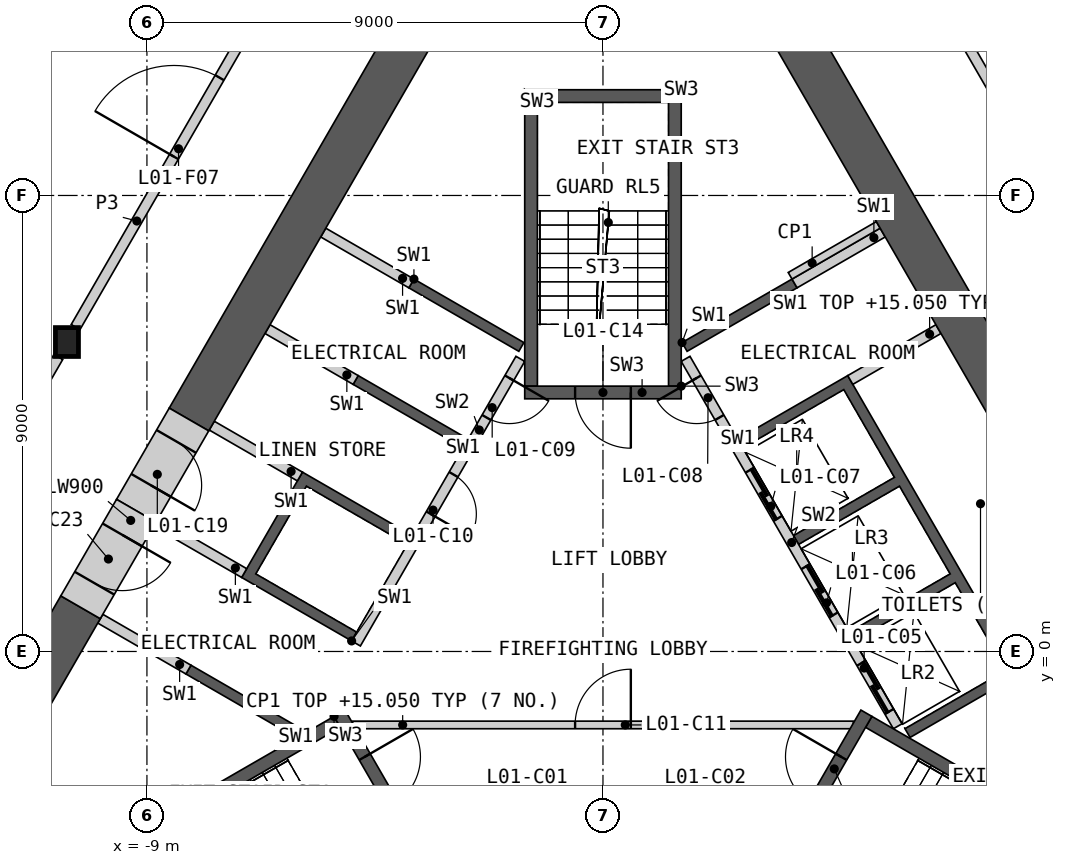
"""IFC4 building model, lengths in metres.
Left out: names, types, materials, properties, quantities, classifications, styles, units other than length and angle.
Written with IfcOpenShell. Run it as: python <this file> out.ifc"""

import sys

from ifc_helpers import new_model, si_unit, direction, frame, frame_2d, origin, origin_2d, place, context, subcontext, project, spatial, polyline, rectangle, i_section, outline, extrude, element, fill, save


model = new_model("IFC4")
c1 = context("Model", 3, precision=1e-05, world=origin(), true_north=direction((0.0, 1.0)))
c2 = subcontext(c1, "Body", "Model", "MODEL_VIEW")
j1 = project(units=[si_unit("LENGTHUNIT", "METRE"), si_unit("PLANEANGLEUNIT", "RADIAN")], contexts=[c1])
p1 = place(None, origin())
s1 = spatial("IfcSite", under=j1, at=p1, CompositionType="ELEMENT")
p2 = place(p1, origin())
s2 = spatial("IfcBuilding", under=s1, at=p2, CompositionType="ELEMENT")
p3 = place(p2, frame((0.0, 0.0, 10.0)))
s3 = spatial("IfcBuildingStorey", under=s2, at=p3, CompositionType="ELEMENT", Elevation=10.0)
p4 = place(p3, frame((-10.578, 6.107, 0.0), z_axis=(0.0, 0.0, 1.0), x_axis=(1.0, 0.0, 0.0)))
e1 = element("IfcColumn", 1, at=p4, inside=s3, PredefinedType="COLUMN", context=c2, shape_type="SweptSolid", body=[
    extrude(i_section(OverallWidth=0.454, OverallDepth=0.57, WebThickness=0.078, FlangeThickness=0.125, at=origin_2d()), origin(), (0.0, 0.0, 1.0), 5.5),
])
p5 = place(p3, origin())
e2 = element("IfcWall", 2, at=p5, inside=s3, PredefinedType="SHEAR", context=c2, shape_type="SweptSolid", body=[
    extrude(outline(polyline([(1.561, 6.097), (3.731, 7.35), (3.831, 7.177), (1.66, 5.924), (1.561, 6.097)])), origin(), (0.0, 0.0, 1.0), 5.05),
])
p6 = place(p3, origin())
e3 = element("IfcWall", 3, at=p6, inside=s3, PredefinedType="SHEAR", context=c2, shape_type="SweptSolid", body=[
    extrude(outline(polyline([(2.66, 4.192), (4.831, 5.445), (8.231, -0.444), (6.061, -1.697), (5.96, -1.524), (7.952, -0.374), (6.952, 1.358), (4.96, 0.208), (4.861, 0.381), (6.852, 1.531), (5.852, 3.263), (3.861, 2.113), (3.76, 2.287), (5.752, 3.437), (4.752, 5.169), (2.76, 4.019), (2.66, 4.192)])), origin(), (0.0, 0.0, 1.0), 5.05),
])
p7 = place(p3, frame((5.817, -1.476, 0.0), z_axis=(0.0, 0.0, 1.0), x_axis=(-0.500002616675, 0.866023893041, 0.0)))
e4 = element("IfcWall", 4, at=p7, inside=s3, PredefinedType="SOLIDWALL", context=c2, shape_type="SweptSolid", body=[
    extrude(rectangle(XDim=8.373, YDim=0.2, at=frame_2d((4.187, 0.0))), origin(), (0.0, 0.0, 1.0), 5.05),
])
p8 = place(p7, frame((0.337, 0.0, 0.0)))
e5 = element("IfcOpeningElement", 5, at=p8, cuts=e4, PredefinedType="OPENING", context=c2, shape_type="SweptSolid", body=[
    extrude(rectangle(XDim=1.1, YDim=2.1, at=frame_2d((0.55, 1.05))), frame((0.0, 0.11, 0.0), z_axis=(0.0, -1.0, 0.0), x_axis=(1.0, 0.0, 0.0)), (0.0, 0.0, 1.0), 0.22),
])
p9 = place(p7, frame((2.537, 0.0, 0.0)))
e6 = element("IfcOpeningElement", 6, at=p9, cuts=e4, PredefinedType="OPENING", context=c2, shape_type="SweptSolid", body=[
    extrude(rectangle(XDim=1.1, YDim=2.1, at=frame_2d((0.55, 1.05))), frame((0.0, 0.11, 0.0), z_axis=(0.0, -1.0, 0.0), x_axis=(1.0, 0.0, 0.0)), (0.0, 0.0, 1.0), 0.22),
])
p10 = place(p7, frame((4.737, 0.0, 0.0)))
e7 = element("IfcOpeningElement", 7, at=p10, cuts=e4, PredefinedType="OPENING", context=c2, shape_type="SweptSolid", body=[
    extrude(rectangle(XDim=1.1, YDim=2.1, at=frame_2d((0.55, 1.05))), frame((0.0, 0.11, 0.0), z_axis=(0.0, -1.0, 0.0), x_axis=(1.0, 0.0, 0.0)), (0.0, 0.0, 1.0), 0.22),
])
p11 = place(p7, frame((7.037, 0.0, 0.0)))
e8 = element("IfcOpeningElement", 8, at=p11, cuts=e4, PredefinedType="OPENING", context=c2, shape_type="SweptSolid", body=[
    extrude(rectangle(XDim=0.9, YDim=2.1, at=frame_2d((0.45, 1.05))), frame((0.0, 0.11, 0.0), z_axis=(0.0, -1.0, 0.0), x_axis=(1.0, 0.0, 0.0)), (0.0, 0.0, 1.0), 0.22),
])
p12 = place(p3, frame((4.881, 5.358, 0.0), z_axis=(0.0, 0.0, 1.0), x_axis=(0.866035824272, 0.499981950752, 0.0)))
e9 = element("IfcWall", 9, at=p12, inside=s3, PredefinedType="SHEAR", context=c2, shape_type="SweptSolid", body=[
    extrude(rectangle(XDim=2.009, YDim=0.2, at=frame_2d((1.004, 0.0))), origin(), (0.0, 0.0, 1.0), 5.05),
])
p13 = place(p3, frame((3.781, 7.263, 0.0), z_axis=(0.0, 0.0, 1.0), x_axis=(0.865983199114, 0.50007309351, 0.0)))
e10 = element("IfcWall", 10, at=p13, inside=s3, PredefinedType="SHEAR", context=c2, shape_type="SweptSolid", body=[
    extrude(rectangle(XDim=2.009, YDim=0.2, at=frame_2d((1.004, 0.0))), origin(), (0.0, 0.0, 1.0), 5.05),
])
p14 = place(p3, origin())
e11 = element("IfcWall", 11, at=p14, inside=s3, PredefinedType="SHEAR", context=c2, shape_type="SweptSolid", body=[
    extrude(outline(polyline([(-6.061, -1.697), (-8.231, -0.444), (-8.131, -0.271), (-5.96, -1.524), (-6.061, -1.697)])), origin(), (0.0, 0.0, 1.0), 5.05),
])
p15 = place(p3, origin())
e12 = element("IfcWall", 12, at=p15, inside=s3, PredefinedType="SHEAR", context=c2, shape_type="SweptSolid", body=[
    extrude(outline(polyline([(-4.96, 0.208), (-7.131, 1.461), (-5.931, 3.54), (-3.76, 2.287), (-3.861, 2.113), (-5.852, 3.263), (-6.852, 1.531), (-4.861, 0.381), (-4.96, 0.208)])), origin(), (0.0, 0.0, 1.0), 5.05),
])
p16 = place(p3, origin())
e13 = element("IfcWall", 13, at=p16, inside=s3, PredefinedType="SHEAR", context=c2, shape_type="SweptSolid", body=[
    extrude(outline(polyline([(-2.76, 4.019), (-4.931, 5.272), (-4.831, 5.445), (-2.66, 4.192), (-2.76, 4.019)])), origin(), (0.0, 0.0, 1.0), 5.05),
])
p17 = place(p3, origin())
e14 = element("IfcWall", 14, at=p17, inside=s3, PredefinedType="SHEAR", context=c2, shape_type="SweptSolid", body=[
    extrude(outline(polyline([(-3.731, 7.35), (-1.561, 6.097), (-1.66, 5.924), (-3.831, 7.177), (-3.731, 7.35)])), origin(), (0.0, 0.0, 1.0), 5.05),
])
p18 = place(p3, frame((-1.631, 5.776, 0.0), z_axis=(0.0, 0.0, 1.0), x_axis=(-0.499992876559, -0.866029516466, 0.0)))
e15 = element("IfcWall", 15, at=p18, inside=s3, PredefinedType="SOLIDWALL", context=c2, shape_type="SweptSolid", body=[
    extrude(rectangle(XDim=6.486, YDim=0.2, at=frame_2d((3.243, 0.0))), origin(), (0.0, 0.0, 1.0), 5.05),
])
p19 = place(p18, frame((0.437, 0.0, 0.0)))
e16 = element("IfcOpeningElement", 16, at=p19, cuts=e15, PredefinedType="OPENING", context=c2, shape_type="SweptSolid", body=[
    extrude(rectangle(XDim=0.9, YDim=2.1, at=frame_2d((0.45, 1.05))), frame((0.0, 0.11, 0.0), z_axis=(0.0, -1.0, 0.0), x_axis=(1.0, 0.0, 0.0)), (0.0, 0.0, 1.0), 0.22),
])
p20 = place(p18, frame((2.637, 0.0, 0.0)))
e17 = element("IfcOpeningElement", 17, at=p20, cuts=e15, PredefinedType="OPENING", context=c2, shape_type="SweptSolid", body=[
    extrude(rectangle(XDim=0.9, YDim=2.1, at=frame_2d((0.45, 1.05))), frame((0.0, 0.11, 0.0), z_axis=(0.0, -1.0, 0.0), x_axis=(1.0, 0.0, 0.0)), (0.0, 0.0, 1.0), 0.22),
])
p21 = place(p3, frame((-3.781, 7.263, 0.0), z_axis=(0.0, 0.0, 1.0), x_axis=(-0.865983199114, 0.50007309351, 0.0)))
e18 = element("IfcWall", 18, at=p21, inside=s3, PredefinedType="SHEAR", context=c2, shape_type="SweptSolid", body=[
    extrude(rectangle(XDim=2.009, YDim=0.2, at=frame_2d((1.004, 0.0))), origin(), (0.0, 0.0, 1.0), 5.05),
])
p22 = place(p3, frame((-4.881, 5.358, 0.0), z_axis=(0.0, 0.0, 1.0), x_axis=(-0.866035824272, 0.499981950752, 0.0)))
e19 = element("IfcWall", 19, at=p22, inside=s3, PredefinedType="SHEAR", context=c2, shape_type="SweptSolid", body=[
    extrude(rectangle(XDim=2.009, YDim=0.2, at=frame_2d((1.004, 0.0))), origin(), (0.0, 0.0, 1.0), 5.05),
])
p23 = place(p3, frame((-5.981, 3.453, 0.0), z_axis=(0.0, 0.0, 1.0), x_axis=(-0.866013584312, 0.500020471368, 0.0)))
e20 = element("IfcWall", 20, at=p23, inside=s3, PredefinedType="SHEAR", context=c2, shape_type="SweptSolid", body=[
    extrude(rectangle(XDim=2.009, YDim=0.2, at=frame_2d((1.005, 0.0))), origin(), (0.0, 0.0, 1.0), 5.05),
])
p24 = place(p3, frame((-7.081, 1.548, 0.0), z_axis=(0.0, 0.0, 1.0), x_axis=(-0.865983199114, 0.50007309351, 0.0)))
e21 = element("IfcWall", 21, at=p24, inside=s3, PredefinedType="SHEAR", context=c2, shape_type="SweptSolid", body=[
    extrude(rectangle(XDim=2.009, YDim=0.2, at=frame_2d((1.004, 0.0))), origin(), (0.0, 0.0, 1.0), 5.05),
])
p25 = place(p3, frame((-8.181, -0.357, 0.0), z_axis=(0.0, 0.0, 1.0), x_axis=(-0.866035824272, 0.499981950752, 0.0)))
e22 = element("IfcWall", 22, at=p25, inside=s3, PredefinedType="SHEAR", context=c2, shape_type="SweptSolid", body=[
    extrude(rectangle(XDim=2.009, YDim=0.2, at=frame_2d((1.004, 0.0))), origin(), (0.0, 0.0, 1.0), 5.05),
])
p26 = place(p3, frame((-4.941, -1.45, 0.0), z_axis=(0.0, 0.0, 1.0), x_axis=(1.0, 0.0, 0.0)))
e23 = element("IfcWall", 23, at=p26, inside=s3, PredefinedType="PARTITIONING", context=c2, shape_type="SweptSolid", body=[
    extrude(rectangle(XDim=9.882, YDim=0.15, at=frame_2d((4.941, 0.0))), origin(), (0.0, 0.0, 1.0), 5.05),
])
p27 = place(p26, frame((4.391, 0.0, 0.0)))
e24 = element("IfcOpeningElement", 24, at=p27, cuts=e23, PredefinedType="OPENING", context=c2, shape_type="SweptSolid", body=[
    extrude(rectangle(XDim=1.1, YDim=2.1, at=frame_2d((0.55, 1.05))), frame((0.0, 0.085, 0.0), z_axis=(0.0, -1.0, 0.0), x_axis=(1.0, 0.0, 0.0)), (0.0, 0.0, 1.0), 0.17),
])
p28 = place(p3, origin())
e25 = element("IfcWall", 25, at=p28, inside=s3, PredefinedType="SHEAR", context=c2, shape_type="SweptSolid", body=[
    extrude(outline(polyline([(-5.307, -1.281), (-10.374, -4.206), (-10.032, -4.298), (-5.182, -1.498), (-5.307, -1.281)])), origin(), (0.0, 0.0, 1.0), 5.05),
])
p29 = place(p3, frame((-5.199, -1.219, 0.0), z_axis=(0.0, 0.0, 1.0), x_axis=(0.499982516597, -0.866035497597, 0.0)))
e26 = element("IfcWall", 26, at=p29, inside=s3, PredefinedType="SHEAR", context=c2, shape_type="SweptSolid", body=[
    extrude(rectangle(XDim=3.088, YDim=0.25, at=frame_2d((1.544, 0.0))), origin(), (0.0, 0.0, 1.0), 5.05),
])
p30 = place(p29, frame((0.994, 0.0, 0.0)))
e27 = element("IfcOpeningElement", 27, at=p30, cuts=e26, PredefinedType="OPENING", context=c2, shape_type="SweptSolid", body=[
    extrude(rectangle(XDim=1.1, YDim=2.1, at=frame_2d((0.55, 1.05))), frame((0.0, 0.135, 0.0), z_axis=(0.0, -1.0, 0.0), x_axis=(1.0, 0.0, 0.0)), (0.0, 0.0, 1.0), 0.27),
])
p31 = place(p3, origin())
e28 = element("IfcWall", 28, at=p31, inside=s3, PredefinedType="SHEAR", context=c2, shape_type="SweptSolid", body=[
    extrude(outline(polyline([(10.032, -4.298), (10.374, -4.206), (5.307, -1.281), (5.182, -1.498), (10.032, -4.298)])), origin(), (0.0, 0.0, 1.0), 5.05),
])
p32 = place(p3, frame((3.655, -3.893, 0.0), z_axis=(0.0, 0.0, 1.0), x_axis=(0.499982516597, 0.866035497597, 0.0)))
e29 = element("IfcWall", 29, at=p32, inside=s3, PredefinedType="SHEAR", context=c2, shape_type="SweptSolid", body=[
    extrude(rectangle(XDim=3.088, YDim=0.25, at=frame_2d((1.544, 0.0))), origin(), (0.0, 0.0, 1.0), 5.05),
])
p33 = place(p32, frame((0.994, 0.0, 0.0)))
e30 = element("IfcOpeningElement", 30, at=p33, cuts=e29, PredefinedType="OPENING", context=c2, shape_type="SweptSolid", body=[
    extrude(rectangle(XDim=1.1, YDim=2.1, at=frame_2d((0.55, 1.05))), frame((0.0, 0.135, 0.0), z_axis=(0.0, -1.0, 0.0), x_axis=(1.0, 0.0, 0.0)), (0.0, 0.0, 1.0), 0.27),
])
p34 = place(p3, origin())
e31 = element("IfcWall", 31, at=p34, inside=s3, PredefinedType="SHEAR", context=c2, shape_type="SweptSolid", body=[
    extrude(outline(polyline([(1.544, 5.237), (1.544, 11.087), (1.294, 10.837), (1.294, 5.237), (1.544, 5.237)])), origin(), (0.0, 0.0, 1.0), 5.05),
])
p35 = place(p3, origin())
e32 = element("IfcWall", 32, at=p35, inside=s3, PredefinedType="SHEAR", context=c2, shape_type="SweptSolid", body=[
    extrude(outline(polyline([(1.544, 11.087), (-1.544, 11.087), (-1.294, 10.837), (1.294, 10.837), (1.544, 11.087)])), origin(), (0.0, 0.0, 1.0), 5.05),
])
p36 = place(p3, origin())
e33 = element("IfcWall", 33, at=p36, inside=s3, PredefinedType="SHEAR", context=c2, shape_type="SweptSolid", body=[
    extrude(outline(polyline([(-1.294, 10.837), (-1.544, 11.087), (-1.544, 5.237), (-1.294, 5.237), (-1.294, 10.837)])), origin(), (0.0, 0.0, 1.0), 5.05),
])
p37 = place(p3, frame((1.544, 5.112, 0.0), z_axis=(0.0, 0.0, 1.0), x_axis=(-1.0, 0.0, 0.0)))
e34 = element("IfcWall", 34, at=p37, inside=s3, PredefinedType="SHEAR", context=c2, shape_type="SweptSolid", body=[
    extrude(rectangle(XDim=3.088, YDim=0.25, at=frame_2d((1.544, 0.0))), origin(), (0.0, 0.0, 1.0), 5.05),
])
p38 = place(p37, frame((0.994, 0.0, 0.0)))
e35 = element("IfcOpeningElement", 35, at=p38, cuts=e34, PredefinedType="OPENING", context=c2, shape_type="SweptSolid", body=[
    extrude(rectangle(XDim=1.1, YDim=2.1, at=frame_2d((0.55, 1.05))), frame((0.0, 0.135, 0.0), z_axis=(0.0, -1.0, 0.0), x_axis=(1.0, 0.0, 0.0)), (0.0, 0.0, 1.0), 0.27),
])
p39 = place(p3, frame((3.693, 7.415, 0.0), z_axis=(0.0, 0.0, 1.0), x_axis=(0.866035824272, 0.499981950752, 0.0)))
e36 = element("IfcWall", 36, at=p39, inside=s3, PredefinedType="PARTITIONING", context=c2, shape_type="SweptSolid", body=[
    extrude(rectangle(XDim=2.009, YDim=0.15, at=frame_2d((1.004, 0.0))), origin(), (0.0, 0.0, 1.0), 5.05),
])
p40 = place(p3, frame((8.16, 4.596, 0.0), z_axis=(0.0, 0.0, 1.0), x_axis=(-0.500009830349, 0.866019728156, 0.0)))
e37 = element("IfcWall", 37, at=p40, inside=s3, PredefinedType="SHEAR", context=c2, shape_type="SweptSolid", body=[
    extrude(rectangle(XDim=15.541, YDim=0.9, at=frame_2d((7.771, 0.0))), origin(), (0.0, 0.0, 1.0), 5.05),
])
p41 = place(p3, frame((-3.675, 12.365, 0.0), z_axis=(0.0, 0.0, 1.0), x_axis=(-0.500014716158, -0.86601690724, 0.0)))
e38 = element("IfcWall", 38, at=p41, inside=s3, PredefinedType="SHEAR", context=c2, shape_type="SweptSolid", body=[
    extrude(rectangle(XDim=8.99, YDim=0.9, at=frame_2d((4.495, 0.0))), origin(), (0.0, 0.0, 1.0), 5.05),
])
p42 = place(p3, frame((-10.31, 0.872, 0.0), z_axis=(0.0, 0.0, 1.0), x_axis=(-0.499991893987, -0.866030083742, 0.0)))
e39 = element("IfcWall", 39, at=p42, inside=s3, PredefinedType="SHEAR", context=c2, shape_type="SweptSolid", body=[
    extrude(rectangle(XDim=4.471, YDim=0.9, at=frame_2d((2.235, 0.0))), origin(), (0.0, 0.0, 1.0), 5.05),
])
p43 = place(p3, frame((-8.17, 4.579, 0.0), z_axis=(0.0, 0.0, 1.0), x_axis=(-0.499888406853, -0.866089822532, 0.0)))
e40 = element("IfcWall", 40, at=p43, inside=s3, PredefinedType="SHEAR", context=c2, shape_type="SweptSolid", body=[
    extrude(rectangle(XDim=2.08, YDim=0.9, at=frame_2d((1.04, 0.0))), origin(), (0.0, 0.0, 1.0), 5.05),
])
p44 = place(p43, frame((0.5, 0.0, 0.0)))
e41 = element("IfcOpeningElement", 41, at=p44, cuts=e40, PredefinedType="OPENING", context=c2, shape_type="SweptSolid", body=[
    extrude(rectangle(XDim=1.0, YDim=2.1, at=frame_2d((0.5, 1.05))), frame((0.0, 0.46, 0.0), z_axis=(0.0, -1.0, 0.0), x_axis=(1.0, 0.0, 0.0)), (0.0, 0.0, 1.0), 0.92),
])
p45 = place(p3, frame((-9.21, 2.777, 0.0), z_axis=(0.0, 0.0, 1.0), x_axis=(-0.500077893725, -0.86598042715, 0.0)))
e42 = element("IfcWall", 42, at=p45, inside=s3, PredefinedType="SHEAR", context=c2, shape_type="SweptSolid", body=[
    extrude(rectangle(XDim=2.2, YDim=0.9, at=frame_2d((1.1, 0.0))), origin(), (0.0, 0.0, 1.0), 5.05),
])
p46 = place(p45, frame((0.55, 0.0, 0.0)))
e43 = element("IfcOpeningElement", 43, at=p46, cuts=e42, PredefinedType="OPENING", context=c2, shape_type="SweptSolid", body=[
    extrude(rectangle(XDim=1.1, YDim=2.1, at=frame_2d((0.55, 1.05))), frame((0.0, 0.46, 0.0), z_axis=(0.0, -1.0, 0.0), x_axis=(1.0, 0.0, 0.0)), (0.0, 0.0, 1.0), 0.92),
])
p47 = place(p3, frame((5.459, 14.974, 0.0), z_axis=(0.0, 0.0, 1.0), x_axis=(0.499985793049, -0.866033606016, 0.0)))
e44 = element("IfcWall", 44, at=p47, inside=s3, PredefinedType="PARTITIONING", context=c2, shape_type="SweptSolid", body=[
    extrude(rectangle(XDim=9.898, YDim=0.2, at=frame_2d((4.949, 0.0))), origin(), (0.0, 0.0, 1.0), 5.05),
])
p48 = place(p3, frame((-15.698, -2.759, 0.0), z_axis=(0.0, 0.0, 1.0), x_axis=(0.500004292778, 0.866022925334, 0.0)))
e45 = element("IfcWall", 45, at=p48, inside=s3, PredefinedType="PARTITIONING", context=c2, shape_type="SweptSolid", body=[
    extrude(rectangle(XDim=9.898, YDim=0.2, at=frame_2d((4.949, 0.0))), origin(), (0.0, 0.0, 1.0), 5.05),
])
p49 = place(p3, frame((-10.408, 6.402, 0.0), z_axis=(0.0, 0.0, 1.0), x_axis=(0.499986904098, 0.866032964575, 0.0)))
e46 = element("IfcWall", 46, at=p49, inside=s3, PredefinedType="PARTITIONING", context=c2, shape_type="SweptSolid", body=[
    extrude(rectangle(XDim=9.67, YDim=0.2, at=frame_2d((4.835, 0.0))), origin(), (0.0, 0.0, 1.0), 5.05),
])
p50 = place(p49, frame((3.884, 0.0, 0.0)))
e47 = element("IfcOpeningElement", 47, at=p50, cuts=e46, PredefinedType="OPENING", context=c2, shape_type="SweptSolid", body=[
    extrude(rectangle(XDim=1.8, YDim=2.1, at=frame_2d((0.9, 1.05))), frame((0.0, 0.11, 0.0), z_axis=(0.0, -1.0, 0.0), x_axis=(1.0, 0.0, 0.0)), (0.0, 0.0, 1.0), 0.22),
])
p51 = place(p8, origin())
e48 = element("IfcDoor", 48, at=p51, inside=s3, OperationType="SLIDING_TO_LEFT", PredefinedType="DOOR", context=c2, shape_type="SweptSolid", body=[
    extrude(rectangle(XDim=1.1, YDim=2.1, at=frame_2d((0.55, 1.05))), frame((0.0, 0.025, 0.0), z_axis=(0.0, -1.0, 0.0), x_axis=(1.0, 0.0, 0.0)), (0.0, 0.0, 1.0), 0.05),
])
fill(e5, e48)
p52 = place(p9, origin())
e49 = element("IfcDoor", 49, at=p52, inside=s3, OperationType="SLIDING_TO_LEFT", PredefinedType="DOOR", context=c2, shape_type="SweptSolid", body=[
    extrude(rectangle(XDim=1.1, YDim=2.1, at=frame_2d((0.55, 1.05))), frame((0.0, 0.025, 0.0), z_axis=(0.0, -1.0, 0.0), x_axis=(1.0, 0.0, 0.0)), (0.0, 0.0, 1.0), 0.05),
])
fill(e6, e49)
p53 = place(p10, origin())
e50 = element("IfcDoor", 50, at=p53, inside=s3, OperationType="SLIDING_TO_LEFT", PredefinedType="DOOR", context=c2, shape_type="SweptSolid", body=[
    extrude(rectangle(XDim=1.1, YDim=2.1, at=frame_2d((0.55, 1.05))), frame((0.0, 0.025, 0.0), z_axis=(0.0, -1.0, 0.0), x_axis=(1.0, 0.0, 0.0)), (0.0, 0.0, 1.0), 0.05),
])
fill(e7, e50)
p54 = place(p11, origin())
e51 = element("IfcDoor", 51, at=p54, inside=s3, OperationType="SINGLE_SWING_RIGHT", PredefinedType="DOOR", context=c2, shape_type="SweptSolid", body=[
    extrude(rectangle(XDim=0.9, YDim=2.1, at=frame_2d((0.45, 1.05))), frame((0.0, 0.025, 0.0), z_axis=(0.0, -1.0, 0.0), x_axis=(1.0, 0.0, 0.0)), (0.0, 0.0, 1.0), 0.05),
])
fill(e8, e51)
p55 = place(p19, origin())
e52 = element("IfcDoor", 52, at=p55, inside=s3, OperationType="SINGLE_SWING_LEFT", PredefinedType="DOOR", context=c2, shape_type="SweptSolid", body=[
    extrude(rectangle(XDim=0.9, YDim=2.1, at=frame_2d((0.45, 1.05))), frame((0.0, 0.025, 0.0), z_axis=(0.0, -1.0, 0.0), x_axis=(1.0, 0.0, 0.0)), (0.0, 0.0, 1.0), 0.05),
])
fill(e16, e52)
p56 = place(p20, origin())
e53 = element("IfcDoor", 53, at=p56, inside=s3, OperationType="SINGLE_SWING_RIGHT", PredefinedType="DOOR", context=c2, shape_type="SweptSolid", body=[
    extrude(rectangle(XDim=0.9, YDim=2.1, at=frame_2d((0.45, 1.05))), frame((0.0, 0.025, 0.0), z_axis=(0.0, -1.0, 0.0), x_axis=(1.0, 0.0, 0.0)), (0.0, 0.0, 1.0), 0.05),
])
fill(e17, e53)
p57 = place(p27, origin())
e54 = element("IfcDoor", 54, at=p57, inside=s3, OperationType="SINGLE_SWING_RIGHT", PredefinedType="DOOR", context=c2, shape_type="SweptSolid", body=[
    extrude(rectangle(XDim=1.1, YDim=2.1, at=frame_2d((0.55, 1.05))), frame((0.0, 0.025, 0.0), z_axis=(0.0, -1.0, 0.0), x_axis=(1.0, 0.0, 0.0)), (0.0, 0.0, 1.0), 0.05),
])
fill(e24, e54)
p58 = place(p30, origin())
e55 = element("IfcDoor", 55, at=p58, inside=s3, OperationType="SINGLE_SWING_LEFT", PredefinedType="DOOR", context=c2, shape_type="SweptSolid", body=[
    extrude(rectangle(XDim=1.1, YDim=2.1, at=frame_2d((0.55, 1.05))), frame((0.0, 0.025, 0.0), z_axis=(0.0, -1.0, 0.0), x_axis=(1.0, 0.0, 0.0)), (0.0, 0.0, 1.0), 0.05),
])
fill(e27, e55)
p59 = place(p33, origin())
e56 = element("IfcDoor", 56, at=p59, inside=s3, OperationType="SINGLE_SWING_RIGHT", PredefinedType="DOOR", context=c2, shape_type="SweptSolid", body=[
    extrude(rectangle(XDim=1.1, YDim=2.1, at=frame_2d((0.55, 1.05))), frame((0.0, 0.025, 0.0), z_axis=(0.0, -1.0, 0.0), x_axis=(1.0, 0.0, 0.0)), (0.0, 0.0, 1.0), 0.05),
])
fill(e30, e56)
p60 = place(p38, origin())
e57 = element("IfcDoor", 57, at=p60, inside=s3, OperationType="SINGLE_SWING_LEFT", PredefinedType="DOOR", context=c2, shape_type="SweptSolid", body=[
    extrude(rectangle(XDim=1.1, YDim=2.1, at=frame_2d((0.55, 1.05))), frame((0.0, 0.025, 0.0), z_axis=(0.0, -1.0, 0.0), x_axis=(1.0, 0.0, 0.0)), (0.0, 0.0, 1.0), 0.05),
])
fill(e35, e57)
p61 = place(p44, origin())
e58 = element("IfcDoor", 58, at=p61, inside=s3, OperationType="SINGLE_SWING_RIGHT", PredefinedType="DOOR", context=c2, shape_type="SweptSolid", body=[
    extrude(rectangle(XDim=1.0, YDim=2.1, at=frame_2d((0.5, 1.05))), frame((0.0, 0.205, 0.0), z_axis=(0.0, -1.0, 0.0), x_axis=(1.0, 0.0, 0.0)), (0.0, 0.0, 1.0), 0.05),
])
fill(e41, e58)
p62 = place(p46, origin())
e59 = element("IfcDoor", 59, at=p62, inside=s3, OperationType="SINGLE_SWING_LEFT", PredefinedType="DOOR", context=c2, shape_type="SweptSolid", body=[
    extrude(rectangle(XDim=1.1, YDim=2.1, at=frame_2d((0.55, 1.05))), frame((0.0, 0.205, 0.0), z_axis=(0.0, -1.0, 0.0), x_axis=(1.0, 0.0, 0.0)), (0.0, 0.0, 1.0), 0.05),
])
fill(e43, e59)
p63 = place(p50, origin())
e60 = element("IfcDoor", 60, at=p63, inside=s3, OperationType="DOUBLE_DOOR_SINGLE_SWING", PredefinedType="DOOR", context=c2, shape_type="SweptSolid", body=[
    extrude(rectangle(XDim=1.8, YDim=2.1, at=frame_2d((0.9, 1.05))), frame((0.0, 0.025, 0.0), z_axis=(0.0, -1.0, 0.0), x_axis=(1.0, 0.0, 0.0)), (0.0, 0.0, 1.0), 0.05),
])
fill(e47, e60)
save(model, sys.argv[1])
